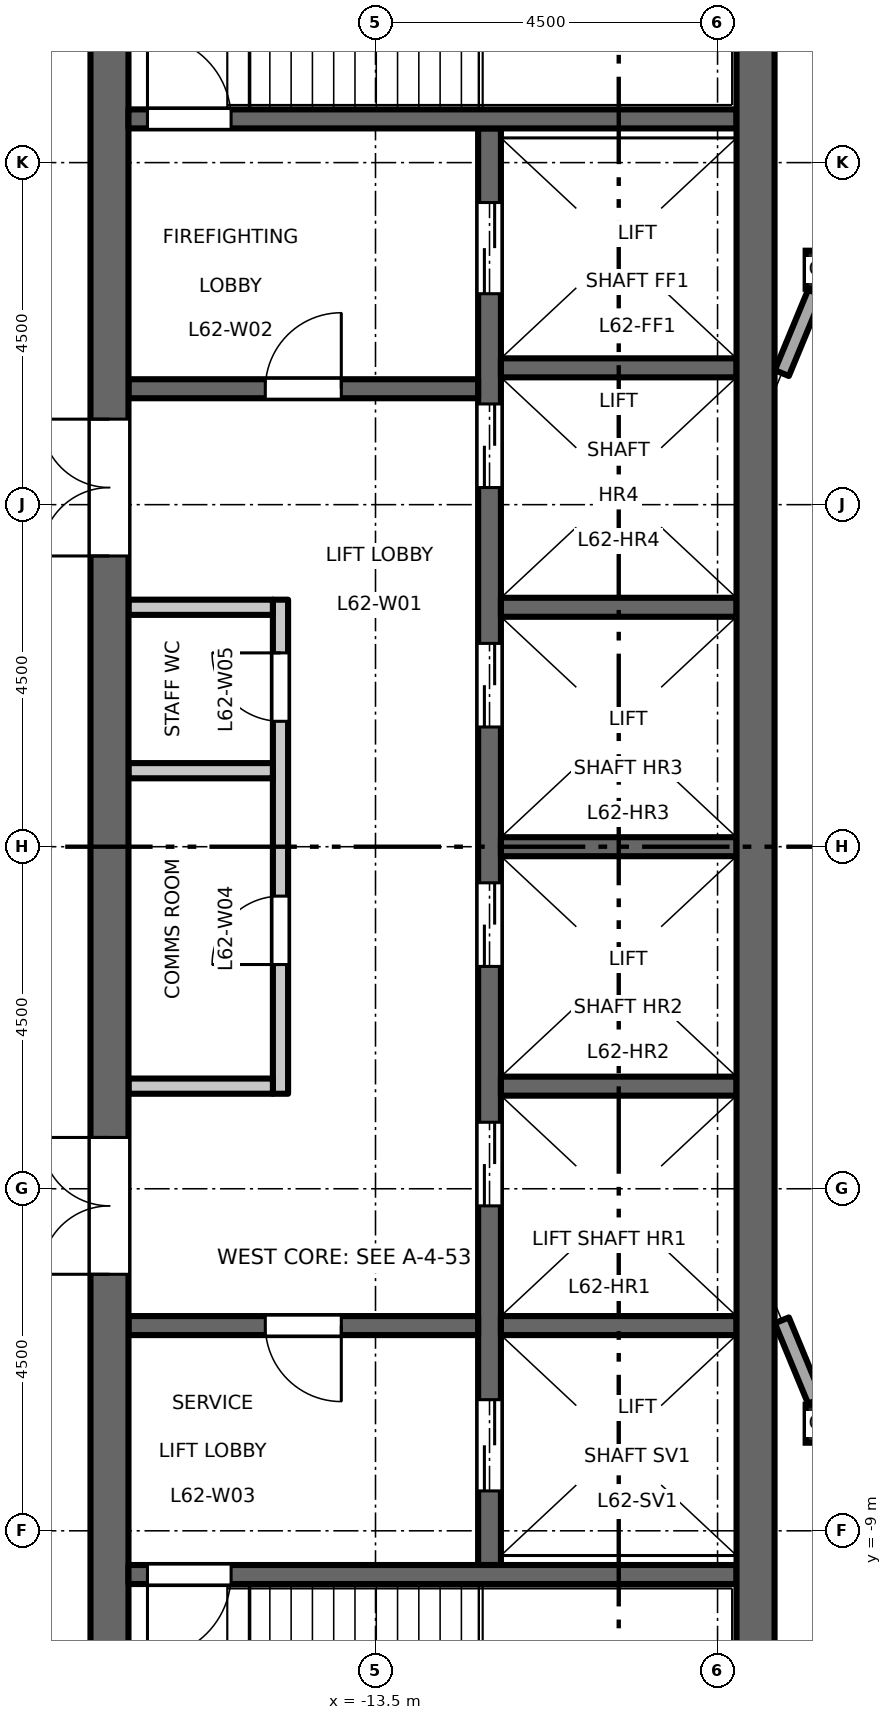
"""IFC4 building model, lengths in metres.
Left out: names, types, materials, properties, quantities, classifications, styles, units other than length and angle.
Written with IfcOpenShell. Run it as: python <this file> out.ifc"""

import sys

from ifc_helpers import new_model, si_unit, direction, frame, frame_2d, origin, origin_2d, place, context, subcontext, project, spatial, rectangle, hollow_rectangle, extrude, element, fill, save


model = new_model("IFC4")
c1 = context("Model", 3, precision=1e-05, world=origin(), true_north=direction((0.0, 1.0)))
c2 = subcontext(c1, "Body", "Model", "MODEL_VIEW")
j1 = project(units=[si_unit("LENGTHUNIT", "METRE"), si_unit("PLANEANGLEUNIT", "RADIAN")], contexts=[c1])
p1 = place(None, origin())
s1 = spatial("IfcSite", under=j1, at=p1, CompositionType="ELEMENT")
p2 = place(p1, origin())
s2 = spatial("IfcBuilding", under=s1, at=p2, CompositionType="ELEMENT")
p3 = place(p2, frame((0.0, 0.0, 289.7)))
s3 = spatial("IfcBuildingStorey", under=s2, at=p3, CompositionType="ELEMENT", Elevation=289.7)
for number, where, z_axis, x_axis in (
    (1, (-7.591, -7.591, 0.0), (0.0, 0.0, 1.0), (1.0, 0.0, 0.0)),
    (2, (-7.591, 7.591, 0.0), (0.0, 0.0, 1.0), (1.0, 0.0, 0.0)),
):
    element("IfcColumn", number, at=place(p3, frame(where, z_axis=z_axis, x_axis=x_axis)), inside=s3, PredefinedType="COLUMN", context=c2, shape_type="SweptSolid", body=[
        extrude(hollow_rectangle(XDim=0.5, YDim=0.5, WallThickness=0.025, at=origin_2d()), origin(), (0.0, 0.0, 1.0), 4.5),
    ])
p4 = place(p3, frame((-14.75, -3.25, 0.0), z_axis=(0.0, 0.0, 1.0), x_axis=(0.0, 1.0, 0.0)))
e3 = element("IfcWall", 3, at=p4, inside=s3, PredefinedType="PARTITIONING", context=c2, shape_type="SweptSolid", body=[
    extrude(rectangle(XDim=6.5, YDim=0.2, at=frame_2d((3.25, 0.0))), origin(), (0.0, 0.0, 1.0), 4.35),
])
p5 = place(p4, frame((1.7, 0.0, 0.0)))
e4 = element("IfcOpeningElement", 4, at=p5, cuts=e3, PredefinedType="OPENING", context=c2, shape_type="SweptSolid", body=[
    extrude(rectangle(XDim=0.9, YDim=2.1, at=frame_2d((0.45, 1.05))), frame((0.0, 0.11, 0.0), z_axis=(0.0, -1.0, 0.0), x_axis=(1.0, 0.0, 0.0)), (0.0, 0.0, 1.0), 0.22),
])
p6 = place(p4, frame((4.9, 0.0, 0.0)))
e5 = element("IfcOpeningElement", 5, at=p6, cuts=e3, PredefinedType="OPENING", context=c2, shape_type="SweptSolid", body=[
    extrude(rectangle(XDim=0.9, YDim=2.1, at=frame_2d((0.45, 1.05))), frame((0.0, 0.11, 0.0), z_axis=(0.0, -1.0, 0.0), x_axis=(1.0, 0.0, 0.0)), (0.0, 0.0, 1.0), 0.22),
])
for number, where, z_axis, x_axis in (
    (6, (-14.85, 3.15, 0.0), (0.0, 0.0, 1.0), (-1.0, 0.0, 0.0)),
    (7, (-14.85, -3.15, 0.0), (0.0, 0.0, 1.0), (-1.0, 0.0, 0.0)),
    (8, (-14.85, 1.0, 0.0), (0.0, 0.0, 1.0), (-1.0, 0.0, 0.0)),
):
    element("IfcWall", number, at=place(p3, frame(where, z_axis=z_axis, x_axis=x_axis)), inside=s3, PredefinedType="PARTITIONING", context=c2, shape_type="SweptSolid", body=[
        extrude(rectangle(XDim=1.9, YDim=0.2, at=frame_2d((0.95, 0.0))), origin(), (0.0, 0.0, 1.0), 4.35),
    ])
p7 = place(p3, frame((-12.0, -9.45, 0.0), z_axis=(0.0, 0.0, 1.0), x_axis=(0.0, 1.0, 0.0)))
e9 = element("IfcWall", 9, at=p7, inside=s3, PredefinedType="SHEAR", context=c2, shape_type="SweptSolid", body=[
    extrude(rectangle(XDim=18.9, YDim=0.3, at=frame_2d((9.45, 0.0))), origin(), (0.0, 0.0, 1.0), 4.35),
])
p8 = place(p7, frame((4.725, 0.0, 0.0)))
e10 = element("IfcOpeningElement", 10, at=p8, cuts=e9, PredefinedType="OPENING", context=c2, shape_type="SweptSolid", body=[
    extrude(rectangle(XDim=1.1, YDim=2.1, at=frame_2d((0.55, 1.05))), frame((0.0, 0.16, 0.0), z_axis=(0.0, -1.0, 0.0), x_axis=(1.0, 0.0, 0.0)), (0.0, 0.0, 1.0), 0.32),
])
p9 = place(p7, frame((7.875, 0.0, 0.0)))
e11 = element("IfcOpeningElement", 11, at=p9, cuts=e9, PredefinedType="OPENING", context=c2, shape_type="SweptSolid", body=[
    extrude(rectangle(XDim=1.1, YDim=2.1, at=frame_2d((0.55, 1.05))), frame((0.0, 0.16, 0.0), z_axis=(0.0, -1.0, 0.0), x_axis=(1.0, 0.0, 0.0)), (0.0, 0.0, 1.0), 0.32),
])
p10 = place(p7, frame((11.025, 0.0, 0.0)))
e12 = element("IfcOpeningElement", 12, at=p10, cuts=e9, PredefinedType="OPENING", context=c2, shape_type="SweptSolid", body=[
    extrude(rectangle(XDim=1.1, YDim=2.1, at=frame_2d((0.55, 1.05))), frame((0.0, 0.16, 0.0), z_axis=(0.0, -1.0, 0.0), x_axis=(1.0, 0.0, 0.0)), (0.0, 0.0, 1.0), 0.32),
])
p11 = place(p7, frame((14.175, 0.0, 0.0)))
e13 = element("IfcOpeningElement", 13, at=p11, cuts=e9, PredefinedType="OPENING", context=c2, shape_type="SweptSolid", body=[
    extrude(rectangle(XDim=1.1, YDim=2.1, at=frame_2d((0.55, 1.05))), frame((0.0, 0.16, 0.0), z_axis=(0.0, -1.0, 0.0), x_axis=(1.0, 0.0, 0.0)), (0.0, 0.0, 1.0), 0.32),
])
p12 = place(p7, frame((16.725, 0.0, 0.0)))
e14 = element("IfcOpeningElement", 14, at=p12, cuts=e9, PredefinedType="OPENING", context=c2, shape_type="SweptSolid", body=[
    extrude(rectangle(XDim=1.2, YDim=2.1, at=frame_2d((0.6, 1.05))), frame((0.0, 0.16, 0.0), z_axis=(0.0, -1.0, 0.0), x_axis=(1.0, 0.0, 0.0)), (0.0, 0.0, 1.0), 0.32),
])
p13 = place(p7, frame((0.975, 0.0, 0.0)))
e15 = element("IfcOpeningElement", 15, at=p13, cuts=e9, PredefinedType="OPENING", context=c2, shape_type="SweptSolid", body=[
    extrude(rectangle(XDim=1.2, YDim=2.1, at=frame_2d((0.6, 1.05))), frame((0.0, 0.16, 0.0), z_axis=(0.0, -1.0, 0.0), x_axis=(1.0, 0.0, 0.0)), (0.0, 0.0, 1.0), 0.32),
])
p14 = place(p3, frame((-12.15, 6.025, 0.0), z_axis=(0.0, 0.0, 1.0), x_axis=(-1.0, 0.0, 0.0)))
e16 = element("IfcWall", 16, at=p14, inside=s3, PredefinedType="SHEAR", context=c2, shape_type="SweptSolid", body=[
    extrude(rectangle(XDim=4.6, YDim=0.25, at=frame_2d((2.3, 0.0))), origin(), (0.0, 0.0, 1.0), 4.35),
])
p15 = place(p14, frame((1.8, 0.0, 0.0)))
e17 = element("IfcOpeningElement", 17, at=p15, cuts=e16, PredefinedType="OPENING", context=c2, shape_type="SweptSolid", body=[
    extrude(rectangle(XDim=1.0, YDim=2.1, at=frame_2d((0.5, 1.05))), frame((0.0, 0.135, 0.0), z_axis=(0.0, -1.0, 0.0), x_axis=(1.0, 0.0, 0.0)), (0.0, 0.0, 1.0), 0.27),
])
p16 = place(p3, frame((-12.15, -6.3, 0.0), z_axis=(0.0, 0.0, 1.0), x_axis=(-1.0, 0.0, 0.0)))
e18 = element("IfcWall", 18, at=p16, inside=s3, PredefinedType="SHEAR", context=c2, shape_type="SweptSolid", body=[
    extrude(rectangle(XDim=4.6, YDim=0.25, at=frame_2d((2.3, 0.0))), origin(), (0.0, 0.0, 1.0), 4.35),
])
p17 = place(p16, frame((1.8, 0.0, 0.0)))
e19 = element("IfcOpeningElement", 19, at=p17, cuts=e18, PredefinedType="OPENING", context=c2, shape_type="SweptSolid", body=[
    extrude(rectangle(XDim=1.0, YDim=2.1, at=frame_2d((0.5, 1.05))), frame((0.0, 0.135, 0.0), z_axis=(0.0, -1.0, 0.0), x_axis=(1.0, 0.0, 0.0)), (0.0, 0.0, 1.0), 0.27),
])
p18 = place(p3, frame((-17.0, -13.0, 0.0), z_axis=(0.0, 0.0, 1.0), x_axis=(0.0, 1.0, 0.0)))
e20 = element("IfcWall", 20, at=p18, inside=s3, PredefinedType="SHEAR", context=c2, shape_type="SweptSolid", body=[
    extrude(rectangle(XDim=26.0, YDim=0.5, at=frame_2d((13.0, 0.0))), origin(), (0.0, 0.0, 1.0), 4.35),
])
p19 = place(p18, frame((16.825, 0.0, 0.0)))
e21 = element("IfcOpeningElement", 21, at=p19, cuts=e20, PredefinedType="OPENING", context=c2, shape_type="SweptSolid", body=[
    extrude(rectangle(XDim=1.8, YDim=2.1, at=frame_2d((0.9, 1.05))), frame((0.0, 0.26, 0.0), z_axis=(0.0, -1.0, 0.0), x_axis=(1.0, 0.0, 0.0)), (0.0, 0.0, 1.0), 0.52),
])
p20 = place(p18, frame((7.375, 0.0, 0.0)))
e22 = element("IfcOpeningElement", 22, at=p20, cuts=e20, PredefinedType="OPENING", context=c2, shape_type="SweptSolid", body=[
    extrude(rectangle(XDim=1.8, YDim=2.1, at=frame_2d((0.9, 1.05))), frame((0.0, 0.26, 0.0), z_axis=(0.0, -1.0, 0.0), x_axis=(1.0, 0.0, 0.0)), (0.0, 0.0, 1.0), 0.52),
])
for number, where, z_axis, x_axis in (
    (23, (-8.75, 0.0, 0.0), (0.0, 0.0, 1.0), (-1.0, 0.0, 0.0)),
    (24, (-8.75, 3.15, 0.0), (0.0, 0.0, 1.0), (-1.0, 0.0, 0.0)),
    (25, (-8.75, 6.3, 0.0), (0.0, 0.0, 1.0), (-1.0, 0.0, 0.0)),
    (26, (-8.75, -3.15, 0.0), (0.0, 0.0, 1.0), (-1.0, 0.0, 0.0)),
    (27, (-8.75, -6.3, 0.0), (0.0, 0.0, 1.0), (-1.0, 0.0, 0.0)),
):
    element("IfcWall", number, at=place(p3, frame(where, z_axis=z_axis, x_axis=x_axis)), inside=s3, PredefinedType="SHEAR", context=c2, shape_type="SweptSolid", body=[
        extrude(rectangle(XDim=3.1, YDim=0.25, at=frame_2d((1.55, 0.0))), origin(), (0.0, 0.0, 1.0), 4.35),
    ])
p21 = place(p3, frame((-8.75, 9.575, 0.0), z_axis=(0.0, 0.0, 1.0), x_axis=(-1.0, 0.0, 0.0)))
e28 = element("IfcWall", 28, at=p21, inside=s3, PredefinedType="SHEAR", context=c2, shape_type="SweptSolid", body=[
    extrude(rectangle(XDim=8.0, YDim=0.25, at=frame_2d((4.0, 0.0))), origin(), (0.0, 0.0, 1.0), 4.35),
])
p22 = place(p21, frame((6.65, 0.0, 0.0)))
e29 = element("IfcOpeningElement", 29, at=p22, cuts=e28, PredefinedType="OPENING", context=c2, shape_type="SweptSolid", body=[
    extrude(rectangle(XDim=1.1, YDim=2.1, at=frame_2d((0.55, 1.05))), frame((0.0, 0.135, 0.0), z_axis=(0.0, -1.0, 0.0), x_axis=(1.0, 0.0, 0.0)), (0.0, 0.0, 1.0), 0.27),
])
p23 = place(p3, frame((-8.75, -9.575, 0.0), z_axis=(0.0, 0.0, 1.0), x_axis=(-1.0, 0.0, 0.0)))
e30 = element("IfcWall", 30, at=p23, inside=s3, PredefinedType="SHEAR", context=c2, shape_type="SweptSolid", body=[
    extrude(rectangle(XDim=8.0, YDim=0.25, at=frame_2d((4.0, 0.0))), origin(), (0.0, 0.0, 1.0), 4.35),
])
p24 = place(p23, frame((6.65, 0.0, 0.0)))
e31 = element("IfcOpeningElement", 31, at=p24, cuts=e30, PredefinedType="OPENING", context=c2, shape_type="SweptSolid", body=[
    extrude(rectangle(XDim=1.1, YDim=2.1, at=frame_2d((0.55, 1.05))), frame((0.0, 0.135, 0.0), z_axis=(0.0, -1.0, 0.0), x_axis=(1.0, 0.0, 0.0)), (0.0, 0.0, 1.0), 0.27),
])
p25 = place(p3, frame((-8.5, -13.0, 0.0), z_axis=(0.0, 0.0, 1.0), x_axis=(0.0, 1.0, 0.0)))
e32 = element("IfcWall", 32, at=p25, inside=s3, PredefinedType="SHEAR", context=c2, shape_type="SweptSolid", body=[
    extrude(rectangle(XDim=26.0, YDim=0.5, at=frame_2d((13.0, 0.0))), origin(), (0.0, 0.0, 1.0), 4.35),
])
for number, where, z_axis, x_axis in (
    (33, (-7.716, 7.289, 0.0), (0.0, 0.0, 1.0), (-0.383, -0.924, 0.0)),
    (34, (-8.154, -6.231, 0.0), (0.0, 0.0, 1.0), (0.383, -0.924, 0.0)),
):
    element("IfcWall", number, at=place(p3, frame(where, z_axis=z_axis, x_axis=x_axis)), inside=s3, PredefinedType="STANDARD", context=c2, shape_type="SweptSolid", body=[
        extrude(rectangle(XDim=1.146, YDim=0.2, at=frame_2d((0.573, 0.0))), origin(), (0.0, 0.0, 1.0), 4.01),
    ])
p26 = place(p15, origin())
e35 = element("IfcDoor", 35, at=p26, inside=s3, OperationType="SINGLE_SWING_LEFT", PredefinedType="DOOR", context=c2, shape_type="SweptSolid", body=[
    extrude(rectangle(XDim=1.0, YDim=2.1, at=frame_2d((0.5, 1.05))), frame((0.0, 0.025, 0.0), z_axis=(0.0, -1.0, 0.0), x_axis=(1.0, 0.0, 0.0)), (0.0, 0.0, 1.0), 0.05),
])
fill(e17, e35)
p27 = place(p17, origin())
e36 = element("IfcDoor", 36, at=p27, inside=s3, OperationType="SINGLE_SWING_RIGHT", PredefinedType="DOOR", context=c2, shape_type="SweptSolid", body=[
    extrude(rectangle(XDim=1.0, YDim=2.1, at=frame_2d((0.5, 1.05))), frame((0.0, 0.025, 0.0), z_axis=(0.0, -1.0, 0.0), x_axis=(1.0, 0.0, 0.0)), (0.0, 0.0, 1.0), 0.05),
])
fill(e19, e36)
p28 = place(p22, origin())
e37 = element("IfcDoor", 37, at=p28, inside=s3, OperationType="SINGLE_SWING_RIGHT", PredefinedType="DOOR", context=c2, shape_type="SweptSolid", body=[
    extrude(rectangle(XDim=1.1, YDim=2.1, at=frame_2d((0.55, 1.05))), frame((0.0, 0.025, 0.0), z_axis=(0.0, -1.0, 0.0), x_axis=(1.0, 0.0, 0.0)), (0.0, 0.0, 1.0), 0.05),
])
fill(e29, e37)
p29 = place(p24, origin())
e38 = element("IfcDoor", 38, at=p29, inside=s3, OperationType="SINGLE_SWING_LEFT", PredefinedType="DOOR", context=c2, shape_type="SweptSolid", body=[
    extrude(rectangle(XDim=1.1, YDim=2.1, at=frame_2d((0.55, 1.05))), frame((0.0, 0.025, 0.0), z_axis=(0.0, -1.0, 0.0), x_axis=(1.0, 0.0, 0.0)), (0.0, 0.0, 1.0), 0.05),
])
fill(e31, e38)
p30 = place(p19, origin())
e39 = element("IfcDoor", 39, at=p30, inside=s3, OperationType="DOUBLE_DOOR_DOUBLE_SWING", PredefinedType="DOOR", context=c2, shape_type="SweptSolid", body=[
    extrude(rectangle(XDim=1.8, YDim=2.1, at=frame_2d((0.9, 1.05))), frame((0.0, 0.025, 0.0), z_axis=(0.0, -1.0, 0.0), x_axis=(1.0, 0.0, 0.0)), (0.0, 0.0, 1.0), 0.05),
])
fill(e21, e39)
p31 = place(p20, origin())
e40 = element("IfcDoor", 40, at=p31, inside=s3, OperationType="DOUBLE_DOOR_DOUBLE_SWING", PredefinedType="DOOR", context=c2, shape_type="SweptSolid", body=[
    extrude(rectangle(XDim=1.8, YDim=2.1, at=frame_2d((0.9, 1.05))), frame((0.0, 0.025, 0.0), z_axis=(0.0, -1.0, 0.0), x_axis=(1.0, 0.0, 0.0)), (0.0, 0.0, 1.0), 0.05),
])
fill(e22, e40)
p32 = place(p8, origin())
e41 = element("IfcDoor", 41, at=p32, inside=s3, OperationType="DOUBLE_DOOR_SLIDING", PredefinedType="DOOR", context=c2, shape_type="SweptSolid", body=[
    extrude(rectangle(XDim=1.1, YDim=2.1, at=frame_2d((0.55, 1.05))), frame((0.0, 0.025, 0.0), z_axis=(0.0, -1.0, 0.0), x_axis=(1.0, 0.0, 0.0)), (0.0, 0.0, 1.0), 0.05),
])
fill(e10, e41)
p33 = place(p9, origin())
e42 = element("IfcDoor", 42, at=p33, inside=s3, OperationType="DOUBLE_DOOR_SLIDING", PredefinedType="DOOR", context=c2, shape_type="SweptSolid", body=[
    extrude(rectangle(XDim=1.1, YDim=2.1, at=frame_2d((0.55, 1.05))), frame((0.0, 0.025, 0.0), z_axis=(0.0, -1.0, 0.0), x_axis=(1.0, 0.0, 0.0)), (0.0, 0.0, 1.0), 0.05),
])
fill(e11, e42)
p34 = place(p10, origin())
e43 = element("IfcDoor", 43, at=p34, inside=s3, OperationType="DOUBLE_DOOR_SLIDING", PredefinedType="DOOR", context=c2, shape_type="SweptSolid", body=[
    extrude(rectangle(XDim=1.1, YDim=2.1, at=frame_2d((0.55, 1.05))), frame((0.0, 0.025, 0.0), z_axis=(0.0, -1.0, 0.0), x_axis=(1.0, 0.0, 0.0)), (0.0, 0.0, 1.0), 0.05),
])
fill(e12, e43)
p35 = place(p11, origin())
e44 = element("IfcDoor", 44, at=p35, inside=s3, OperationType="DOUBLE_DOOR_SLIDING", PredefinedType="DOOR", context=c2, shape_type="SweptSolid", body=[
    extrude(rectangle(XDim=1.1, YDim=2.1, at=frame_2d((0.55, 1.05))), frame((0.0, 0.025, 0.0), z_axis=(0.0, -1.0, 0.0), x_axis=(1.0, 0.0, 0.0)), (0.0, 0.0, 1.0), 0.05),
])
fill(e13, e44)
p36 = place(p12, origin())
e45 = element("IfcDoor", 45, at=p36, inside=s3, OperationType="DOUBLE_DOOR_SLIDING", PredefinedType="DOOR", context=c2, shape_type="SweptSolid", body=[
    extrude(rectangle(XDim=1.2, YDim=2.1, at=frame_2d((0.6, 1.05))), frame((0.0, 0.025, 0.0), z_axis=(0.0, -1.0, 0.0), x_axis=(1.0, 0.0, 0.0)), (0.0, 0.0, 1.0), 0.05),
])
fill(e14, e45)
p37 = place(p13, origin())
e46 = element("IfcDoor", 46, at=p37, inside=s3, OperationType="DOUBLE_DOOR_SLIDING", PredefinedType="DOOR", context=c2, shape_type="SweptSolid", body=[
    extrude(rectangle(XDim=1.2, YDim=2.1, at=frame_2d((0.6, 1.05))), frame((0.0, 0.025, 0.0), z_axis=(0.0, -1.0, 0.0), x_axis=(1.0, 0.0, 0.0)), (0.0, 0.0, 1.0), 0.05),
])
fill(e15, e46)
p38 = place(p5, origin())
e47 = element("IfcDoor", 47, at=p38, inside=s3, OperationType="SINGLE_SWING_RIGHT", PredefinedType="DOOR", context=c2, shape_type="SweptSolid", body=[
    extrude(rectangle(XDim=0.9, YDim=2.1, at=frame_2d((0.45, 1.05))), frame((0.0, 0.025, 0.0), z_axis=(0.0, -1.0, 0.0), x_axis=(1.0, 0.0, 0.0)), (0.0, 0.0, 1.0), 0.05),
])
fill(e4, e47)
p39 = place(p6, origin())
e48 = element("IfcDoor", 48, at=p39, inside=s3, OperationType="SINGLE_SWING_LEFT", PredefinedType="DOOR", context=c2, shape_type="SweptSolid", body=[
    extrude(rectangle(XDim=0.9, YDim=2.1, at=frame_2d((0.45, 1.05))), frame((0.0, 0.025, 0.0), z_axis=(0.0, -1.0, 0.0), x_axis=(1.0, 0.0, 0.0)), (0.0, 0.0, 1.0), 0.05),
])
fill(e5, e48)
save(model, sys.argv[1])
